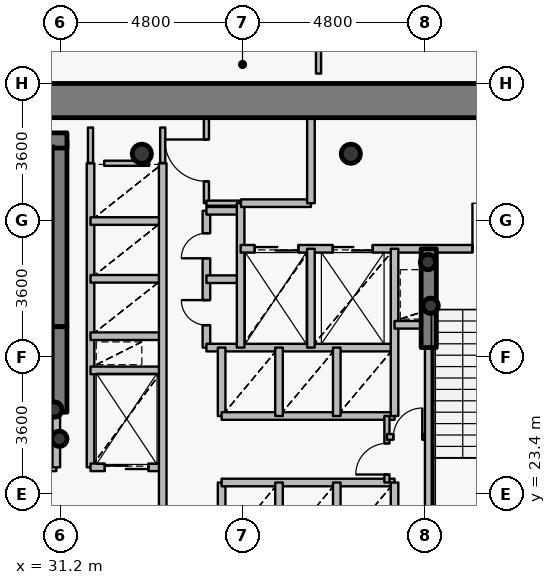
"""IFC4 building model, lengths in metres.
Left out: names, types, materials, properties, quantities, classifications, styles, units other than length and angle.
Written with IfcOpenShell. Run it as: python <this file> out.ifc"""

import sys

from ifc_helpers import new_model, si_unit, direction, frame, frame_2d, origin, origin_2d, place, context, subcontext, project, spatial, rectangle, hollow_circle, extrude, source, transform, mapped, element, fill, save


model = new_model("IFC4")
c1 = context("Model", 3, precision=1e-05, world=origin(), true_north=direction((0.0, 1.0)))
c2 = subcontext(c1, "Body", "Model", "MODEL_VIEW")
j1 = project(units=[si_unit("LENGTHUNIT", "METRE"), si_unit("PLANEANGLEUNIT", "RADIAN")], contexts=[c1])
p1 = place(None, origin())
s1 = spatial("IfcSite", under=j1, at=p1, CompositionType="ELEMENT")
p2 = place(p1, origin())
s2 = spatial("IfcBuilding", under=s1, at=p2, CompositionType="ELEMENT")
p3 = place(p2, frame((0.0, 0.0, 14.4)))
s3 = spatial("IfcBuildingStorey", under=s2, at=p3, CompositionType="ELEMENT", Elevation=14.4)
for number, where, z_axis, x_axis in (
    (1, (38.85, 32.35, 0.0), (0.0, 0.0, 1.0), (1.0, 0.0, 0.0)),
    (2, (33.35, 32.35, 0.0), (0.0, 0.0, 1.0), (1.0, 0.0, 0.0)),
):
    element("IfcColumn", number, at=place(p3, frame(where, z_axis=z_axis, x_axis=x_axis)), inside=s3, PredefinedType="COLUMN", context=c2, shape_type="SweptSolid", body=[
        extrude(hollow_circle(Radius=0.254, WallThickness=0.02, at=origin_2d()), origin(), (0.0, 0.0, 1.0), 4.2),
    ])
p4 = place(p3, frame((31.18, 27.8, 0.0), z_axis=(0.0, 0.0, 1.0), x_axis=(0.0, 1.0, 0.0)))
e3 = element("IfcWall", 3, at=p4, inside=s3, PredefinedType="SHEAR", context=c2, shape_type="SweptSolid", body=[
    extrude(rectangle(XDim=4.9, YDim=0.4, at=frame_2d((2.45, 0.0))), origin(), (0.0, 0.0, 1.0), 4.2),
])
p5 = place(p3, frame((27.28, 32.7, 0.0), z_axis=(0.0, 0.0, 1.0), x_axis=(1.0, 0.0, 0.0)))
e4 = element("IfcWall", 4, at=p5, inside=s3, PredefinedType="SHEAR", context=c2, shape_type="SweptSolid", body=[
    extrude(rectangle(XDim=4.1, YDim=0.4, at=frame_2d((2.05, 0.0))), origin(), (0.0, 0.0, 1.0), 4.2),
])
for number, where, z_axis, x_axis in (
    (5, (31.05, 25.62, 0.0), (0.0, 0.0, 1.0), (1.0, 0.0, 0.0)),
    (6, (31.18, 24.85, 0.0), (0.0, 0.0, 1.0), (1.0, 0.0, 0.0)),
    (7, (40.95, 28.35, 0.0), (0.0, 0.0, 1.0), (1.0, 0.0, 0.0)),
    (8, (40.88, 29.5, 0.0), (0.0, 0.0, 1.0), (1.0, 0.0, 0.0)),
):
    element("IfcColumn", number, at=place(p3, frame(where, z_axis=z_axis, x_axis=x_axis)), inside=s3, PredefinedType="COLUMN", context=c2, shape_type="SweptSolid", body=[
        extrude(hollow_circle(Radius=0.203, WallThickness=0.016, at=origin_2d()), origin(), (0.0, 0.0, 1.0), 4.2),
    ])
p6 = place(p3, frame((26.75, 33.75, 0.0), z_axis=(0.0, 0.0, 1.0), x_axis=(1.0, 0.0, 0.0)))
e9 = element("IfcWall", 9, at=p6, inside=s3, PredefinedType="SHEAR", context=c2, shape_type="SweptSolid", body=[
    extrude(rectangle(XDim=18.5, YDim=0.9, at=frame_2d((9.25, 0.0))), origin(), (0.0, 0.0, 1.0), 3.35),
])
p7 = place(p3, frame((31.18, 25.55, 0.0), z_axis=(0.0, 0.0, 1.0), x_axis=(0.0, 1.0, 0.0)))
e10 = element("IfcWall", 10, at=p7, inside=s3, PredefinedType="SHEAR", context=c2, shape_type="SweptSolid", body=[
    extrude(rectangle(XDim=2.25, YDim=0.4, at=frame_2d((1.125, 0.0))), origin(), (0.0, 0.0, 1.0), 3.5),
])
p8 = place(p3, frame((40.9, 27.25, 0.0), z_axis=(0.0, 0.0, 1.0), x_axis=(0.0, 1.0, 0.0)))
e11 = element("IfcWall", 11, at=p8, inside=s3, PredefinedType="SHEAR", context=c2, shape_type="SweptSolid", body=[
    extrude(rectangle(XDim=2.6, YDim=0.4, at=frame_2d((1.3, 0.0))), origin(), (0.0, 0.0, 1.0), 3.5),
])
p9 = place(p3, frame((27.56, 24.1, 0.0), z_axis=(0.0, 0.0, 1.0), x_axis=(1.0, 0.0, 0.0)))
e12 = element("IfcWall", 12, at=p9, inside=s3, PredefinedType="PARTITIONING", context=c2, shape_type="SweptSolid", body=[
    extrude(rectangle(XDim=3.54, YDim=0.2, at=frame_2d((1.77, 0.0))), origin(), (0.0, 0.0, 1.0), 3.9),
])
p10 = place(p9, frame((1.17, 0.0, 0.0)))
e13 = element("IfcOpeningElement", 13, at=p10, cuts=e12, PredefinedType="OPENING", context=c2, shape_type="SweptSolid", body=[
    extrude(rectangle(XDim=1.2, YDim=2.15, at=origin_2d()), frame((0.6, 0.11, 1.075), z_axis=(0.0, -1.0, 0.0), x_axis=(1.0, 0.0, 0.0)), (0.0, 0.0, 1.0), 0.22),
])
p11 = place(p3, frame((31.1, 24.1, 0.0), z_axis=(0.0, 0.0, 1.0), x_axis=(0.0, 1.0, 0.0)))
e14 = element("IfcWall", 14, at=p11, inside=s3, PredefinedType="PARTITIONING", context=c2, shape_type="SweptSolid", body=[
    extrude(rectangle(XDim=1.44, YDim=0.2, at=frame_2d((0.72, 0.0))), origin(), (0.0, 0.0, 1.0), 3.9),
])
p12 = place(p3, frame((32.0, 24.1, 0.0), z_axis=(0.0, 0.0, 1.0), x_axis=(0.0, 1.0, 0.0)))
e15 = element("IfcWall", 15, at=p12, inside=s3, PredefinedType="PARTITIONING", context=c2, shape_type="SweptSolid", body=[
    extrude(rectangle(XDim=8.0, YDim=0.2, at=frame_2d((4.0, 0.0))), origin(), (0.0, 0.0, 1.0), 3.9),
])
p13 = place(p3, frame((32.0, 24.1, 0.0), z_axis=(0.0, 0.0, 1.0), x_axis=(1.0, 0.0, 0.0)))
e16 = element("IfcWall", 16, at=p13, inside=s3, PredefinedType="PARTITIONING", context=c2, shape_type="SweptSolid", body=[
    extrude(rectangle(XDim=1.9, YDim=0.2, at=frame_2d((0.95, 0.0))), origin(), (0.0, 0.0, 1.0), 3.485),
])
p14 = place(p13, frame((0.375, 0.0, 0.0)))
e17 = element("IfcOpeningElement", 17, at=p14, cuts=e16, PredefinedType="OPENING", context=c2, shape_type="SweptSolid", body=[
    extrude(rectangle(XDim=1.15, YDim=2.15, at=origin_2d()), frame((0.575, 0.11, 1.075), z_axis=(0.0, -1.0, 0.0), x_axis=(1.0, 0.0, 0.0)), (0.0, 0.0, 1.0), 0.22),
])
for number, where, z_axis, x_axis in (
    (18, (32.0, 26.65, 0.0), (0.0, 0.0, 1.0), (1.0, 0.0, 0.0)),
    (19, (32.0, 27.55, 0.0), (0.0, 0.0, 1.0), (1.0, 0.0, 0.0)),
    (20, (32.0, 29.06, 0.0), (0.0, 0.0, 1.0), (1.0, 0.0, 0.0)),
    (21, (32.0, 30.58, 0.0), (0.0, 0.0, 1.0), (1.0, 0.0, 0.0)),
):
    element("IfcWall", number, at=place(p3, frame(where, z_axis=z_axis, x_axis=x_axis)), inside=s3, PredefinedType="PARTITIONING", context=c2, shape_type="SweptSolid", body=[
        extrude(rectangle(XDim=1.9, YDim=0.2, at=frame_2d((0.95, 0.0))), origin(), (0.0, 0.0, 1.0), 3.485),
    ])
p15 = place(p3, frame((33.9, 20.7, 0.0), z_axis=(0.0, 0.0, 1.0), x_axis=(0.0, 1.0, 0.0)))
e22 = element("IfcWall", 22, at=p15, inside=s3, PredefinedType="PARTITIONING", context=c2, shape_type="SweptSolid", body=[
    extrude(rectangle(XDim=11.4, YDim=0.2, at=frame_2d((5.7, 0.0))), origin(), (0.0, 0.0, 1.0), 3.485),
])
p16 = place(p3, frame((35.05, 27.25, 0.0), z_axis=(0.0, 0.0, 1.0), x_axis=(0.0, 1.0, 0.0)))
e23 = element("IfcWall", 23, at=p16, inside=s3, PredefinedType="PARTITIONING", context=c2, shape_type="SweptSolid", body=[
    extrude(rectangle(XDim=3.6, YDim=0.2, at=frame_2d((1.8, 0.0))), origin(), (0.0, 0.0, 1.0), 3.9),
])
p17 = place(p16, frame((0.59, 0.0, 0.0)))
e24 = element("IfcOpeningElement", 24, at=p17, cuts=e23, PredefinedType="OPENING", context=c2, shape_type="SweptSolid", body=[
    extrude(rectangle(XDim=0.66, YDim=2.05, at=origin_2d()), frame((0.33, 0.11, 1.025), z_axis=(0.0, -1.0, 0.0), x_axis=(1.0, 0.0, 0.0)), (0.0, 0.0, 1.0), 0.22),
])
p18 = place(p16, frame((2.35, 0.0, 0.0)))
e25 = element("IfcOpeningElement", 25, at=p18, cuts=e23, PredefinedType="OPENING", context=c2, shape_type="SweptSolid", body=[
    extrude(rectangle(XDim=0.66, YDim=2.05, at=origin_2d()), frame((0.33, 0.11, 1.025), z_axis=(0.0, -1.0, 0.0), x_axis=(1.0, 0.0, 0.0)), (0.0, 0.0, 1.0), 0.22),
])
p19 = place(p3, frame((35.05, 27.25, 0.0), z_axis=(0.0, 0.0, 1.0), x_axis=(1.0, 0.0, 0.0)))
e26 = element("IfcWall", 26, at=p19, inside=s3, PredefinedType="PARTITIONING", context=c2, shape_type="SweptSolid", body=[
    extrude(rectangle(XDim=4.95, YDim=0.2, at=frame_2d((2.475, 0.0))), origin(), (0.0, 0.0, 1.0), 3.485),
])
for number, where, z_axis, x_axis in (
    (27, (35.05, 29.05, 0.0), (0.0, 0.0, 1.0), (1.0, 0.0, 0.0)),
    (28, (35.05, 30.85, 0.0), (0.0, 0.0, 1.0), (1.0, 0.0, 0.0)),
):
    element("IfcWall", number, at=place(p3, frame(where, z_axis=z_axis, x_axis=x_axis)), inside=s3, PredefinedType="PARTITIONING", context=c2, shape_type="SweptSolid", body=[
        extrude(rectangle(XDim=0.9, YDim=0.2, at=frame_2d((0.45, 0.0))), origin(), (0.0, 0.0, 1.0), 3.9),
    ])
p20 = place(p3, frame((35.05, 31.05, 0.0), z_axis=(0.0, 0.0, 1.0), x_axis=(0.0, 1.0, 0.0)))
e29 = element("IfcWall", 29, at=p20, inside=s3, PredefinedType="PARTITIONING", context=c2, shape_type="SweptSolid", body=[
    extrude(rectangle(XDim=2.25, YDim=0.135, at=frame_2d((1.125, 0.0))), origin(), (0.0, 0.0, 1.0), 3.485),
])
p21 = place(p20, frame((0.575, 0.0, 0.0)))
e30 = element("IfcOpeningElement", 30, at=p21, cuts=e29, PredefinedType="OPENING", context=c2, shape_type="SweptSolid", body=[
    extrude(rectangle(XDim=1.1, YDim=2.15, at=origin_2d()), frame((0.55, 0.078, 1.075), z_axis=(0.0, -1.0, 0.0), x_axis=(1.0, 0.0, 0.0)), (0.0, 0.0, 1.0), 0.155),
])
p22 = place(p3, frame((35.05, 31.05, 0.0), z_axis=(0.0, 0.0, 1.0), x_axis=(1.0, 0.0, 0.0)))
e31 = element("IfcWall", 31, at=p22, inside=s3, PredefinedType="PARTITIONING", context=c2, shape_type="SweptSolid", body=[
    extrude(rectangle(XDim=0.9, YDim=0.135, at=frame_2d((0.45, 0.0))), origin(), (0.0, 0.0, 1.0), 3.9),
])
p23 = place(p3, frame((35.45, 21.9, 0.0), z_axis=(0.0, 0.0, 1.0), x_axis=(0.0, 1.0, 0.0)))
e32 = element("IfcWall", 32, at=p23, inside=s3, PredefinedType="PARTITIONING", context=c2, shape_type="SweptSolid", body=[
    extrude(rectangle(XDim=1.8, YDim=0.2, at=frame_2d((0.9, 0.0))), origin(), (0.0, 0.0, 1.0), 3.9),
])
p24 = place(p3, frame((35.45, 23.7, 0.0), z_axis=(0.0, 0.0, 1.0), x_axis=(1.0, 0.0, 0.0)))
e33 = element("IfcWall", 33, at=p24, inside=s3, PredefinedType="PARTITIONING", context=c2, shape_type="SweptSolid", body=[
    extrude(rectangle(XDim=4.55, YDim=0.2, at=frame_2d((2.275, 0.0))), origin(), (0.0, 0.0, 1.0), 3.485),
])
p25 = place(p3, frame((35.45, 25.45, 0.0), z_axis=(0.0, 0.0, 1.0), x_axis=(0.0, 1.0, 0.0)))
e34 = element("IfcWall", 34, at=p25, inside=s3, PredefinedType="PARTITIONING", context=c2, shape_type="SweptSolid", body=[
    extrude(rectangle(XDim=1.8, YDim=0.2, at=frame_2d((0.9, 0.0))), origin(), (0.0, 0.0, 1.0), 3.9),
])
p26 = place(p3, frame((35.45, 25.45, 0.0), z_axis=(0.0, 0.0, 1.0), x_axis=(1.0, 0.0, 0.0)))
e35 = element("IfcWall", 35, at=p26, inside=s3, PredefinedType="PARTITIONING", context=c2, shape_type="SweptSolid", body=[
    extrude(rectangle(XDim=4.55, YDim=0.2, at=frame_2d((2.275, 0.0))), origin(), (0.0, 0.0, 1.0), 3.485),
])
p27 = place(p3, frame((35.95, 27.25, 0.0), z_axis=(0.0, 0.0, 1.0), x_axis=(0.0, 1.0, 0.0)))
e36 = element("IfcWall", 36, at=p27, inside=s3, PredefinedType="PARTITIONING", context=c2, shape_type="SweptSolid", body=[
    extrude(rectangle(XDim=3.8, YDim=0.2, at=frame_2d((1.9, 0.0))), origin(), (0.0, 0.0, 1.0), 3.9),
])
p28 = place(p3, frame((35.95, 29.85, 0.0), z_axis=(0.0, 0.0, 1.0), x_axis=(1.0, 0.0, 0.0)))
e37 = element("IfcWall", 37, at=p28, inside=s3, PredefinedType="PARTITIONING", context=c2, shape_type="SweptSolid", body=[
    extrude(rectangle(XDim=8.49, YDim=0.2, at=frame_2d((4.245, 0.0))), origin(), (0.0, 0.0, 1.0), 3.485),
])
p29 = place(p28, frame((6.1, 0.0, 0.0)))
e38 = element("IfcOpeningElement", 38, at=p29, cuts=e37, PredefinedType="OPENING", context=c2, shape_type="SweptSolid", body=[
    extrude(rectangle(XDim=1.2, YDim=2.15, at=origin_2d()), frame((0.6, 0.11, 1.075), z_axis=(0.0, -1.0, 0.0), x_axis=(1.0, 0.0, 0.0)), (0.0, 0.0, 1.0), 0.22),
])
p30 = place(p28, frame((0.37, 0.0, 0.0)))
e39 = element("IfcOpeningElement", 39, at=p30, cuts=e37, PredefinedType="OPENING", context=c2, shape_type="SweptSolid", body=[
    extrude(rectangle(XDim=1.15, YDim=2.15, at=origin_2d()), frame((0.575, 0.11, 1.075), z_axis=(0.0, -1.0, 0.0), x_axis=(1.0, 0.0, 0.0)), (0.0, 0.0, 1.0), 0.22),
])
p31 = place(p28, frame((2.425, 0.0, 0.0)))
e40 = element("IfcOpeningElement", 40, at=p31, cuts=e37, PredefinedType="OPENING", context=c2, shape_type="SweptSolid", body=[
    extrude(rectangle(XDim=1.05, YDim=2.15, at=origin_2d()), frame((0.525, 0.11, 1.075), z_axis=(0.0, -1.0, 0.0), x_axis=(1.0, 0.0, 0.0)), (0.0, 0.0, 1.0), 0.22),
])
p32 = place(p3, frame((35.96, 31.05, 0.0), z_axis=(0.0, 0.0, 1.0), x_axis=(1.0, 0.0, 0.0)))
e41 = element("IfcWall", 41, at=p32, inside=s3, PredefinedType="PARTITIONING", context=c2, shape_type="SweptSolid", body=[
    extrude(rectangle(XDim=1.84, YDim=0.2, at=frame_2d((0.92, 0.0))), origin(), (0.0, 0.0, 1.0), 3.9),
])
for number, where, z_axis, x_axis in (
    (42, (36.96, 21.9, 0.0), (0.0, 0.0, 1.0), (0.0, 1.0, 0.0)),
    (43, (36.96, 25.45, 0.0), (0.0, 0.0, 1.0), (0.0, 1.0, 0.0)),
):
    element("IfcWall", number, at=place(p3, frame(where, z_axis=z_axis, x_axis=x_axis)), inside=s3, PredefinedType="PARTITIONING", context=c2, shape_type="SweptSolid", body=[
        extrude(rectangle(XDim=1.8, YDim=0.2, at=frame_2d((0.9, 0.0))), origin(), (0.0, 0.0, 1.0), 3.9),
    ])
p33 = place(p3, frame((37.8, 27.25, 0.0), z_axis=(0.0, 0.0, 1.0), x_axis=(0.0, 1.0, 0.0)))
e44 = element("IfcWall", 44, at=p33, inside=s3, PredefinedType="PARTITIONING", context=c2, shape_type="SweptSolid", body=[
    extrude(rectangle(XDim=2.6, YDim=0.2, at=frame_2d((1.3, 0.0))), origin(), (0.0, 0.0, 1.0), 3.9),
])
p34 = place(p3, frame((37.8, 31.05, 0.0), z_axis=(0.0, 0.0, 1.0), x_axis=(0.0, 1.0, 0.0)))
e45 = element("IfcWall", 45, at=p34, inside=s3, PredefinedType="PARTITIONING", context=c2, shape_type="SweptSolid", body=[
    extrude(rectangle(XDim=2.25, YDim=0.2, at=frame_2d((1.125, 0.0))), origin(), (0.0, 0.0, 1.0), 3.485),
])
for number, where, z_axis, x_axis in (
    (46, (38.48, 21.9, 0.0), (0.0, 0.0, 1.0), (0.0, 1.0, 0.0)),
    (47, (38.48, 25.45, 0.0), (0.0, 0.0, 1.0), (0.0, 1.0, 0.0)),
):
    element("IfcWall", number, at=place(p3, frame(where, z_axis=z_axis, x_axis=x_axis)), inside=s3, PredefinedType="PARTITIONING", context=c2, shape_type="SweptSolid", body=[
        extrude(rectangle(XDim=1.8, YDim=0.2, at=frame_2d((0.9, 0.0))), origin(), (0.0, 0.0, 1.0), 3.9),
    ])
p35 = place(p3, frame((39.8, 23.7, 0.0), z_axis=(0.0, 0.0, 1.0), x_axis=(0.0, 1.0, 0.0)))
e48 = element("IfcWall", 48, at=p35, inside=s3, PredefinedType="PARTITIONING", context=c2, shape_type="SweptSolid", body=[
    extrude(rectangle(XDim=1.75, YDim=0.135, at=frame_2d((0.875, 0.0))), origin(), (0.0, 0.0, 1.0), 3.9),
])
p36 = place(p35, frame((0.21, 0.0, 0.0)))
e49 = element("IfcOpeningElement", 49, at=p36, cuts=e48, PredefinedType="OPENING", context=c2, shape_type="SweptSolid", body=[
    extrude(rectangle(XDim=0.82, YDim=2.1, at=origin_2d()), frame((0.41, 0.078, 1.05), z_axis=(0.0, -1.0, 0.0), x_axis=(1.0, 0.0, 0.0)), (0.0, 0.0, 1.0), 0.155),
])
p37 = place(p3, frame((39.8, 24.9, 0.0), z_axis=(0.0, 0.0, 1.0), x_axis=(1.0, 0.0, 0.0)))
e50 = element("IfcWall", 50, at=p37, inside=s3, PredefinedType="PARTITIONING", context=c2, shape_type="SweptSolid", body=[
    extrude(rectangle(XDim=1.1, YDim=0.15, at=frame_2d((0.55, 0.0))), origin(), (0.0, 0.0, 1.0), 3.9),
])
p38 = place(p37, frame((0.17, 0.0, 0.0)))
e51 = element("IfcOpeningElement", 51, at=p38, cuts=e50, PredefinedType="OPENING", context=c2, shape_type="SweptSolid", body=[
    extrude(rectangle(XDim=0.76, YDim=2.1, at=origin_2d()), frame((0.38, 0.085, 1.05), z_axis=(0.0, -1.0, 0.0), x_axis=(1.0, 0.0, 0.0)), (0.0, 0.0, 1.0), 0.17),
])
p39 = place(p3, frame((40.0, 21.9, 0.0), z_axis=(0.0, 0.0, 1.0), x_axis=(0.0, 1.0, 0.0)))
e52 = element("IfcWall", 52, at=p39, inside=s3, PredefinedType="PARTITIONING", context=c2, shape_type="SweptSolid", body=[
    extrude(rectangle(XDim=1.8, YDim=0.2, at=frame_2d((0.9, 0.0))), origin(), (0.0, 0.0, 1.0), 3.9),
])
p40 = place(p3, frame((40.0, 25.45, 0.0), z_axis=(0.0, 0.0, 1.0), x_axis=(0.0, 1.0, 0.0)))
e53 = element("IfcWall", 53, at=p40, inside=s3, PredefinedType="PARTITIONING", context=c2, shape_type="SweptSolid", body=[
    extrude(rectangle(XDim=4.4, YDim=0.2, at=frame_2d((2.2, 0.0))), origin(), (0.0, 0.0, 1.0), 3.9),
])
p41 = place(p3, frame((40.0, 27.85, 0.0), z_axis=(0.0, 0.0, 1.0), x_axis=(1.0, 0.0, 0.0)))
e54 = element("IfcWall", 54, at=p41, inside=s3, PredefinedType="PARTITIONING", context=c2, shape_type="SweptSolid", body=[
    extrude(rectangle(XDim=0.9, YDim=0.2, at=frame_2d((0.45, 0.0))), origin(), (0.0, 0.0, 1.0), 3.9),
])
p42 = place(p3, frame((40.9, 21.33, 0.0), z_axis=(0.0, 0.0, 1.0), x_axis=(0.0, 1.0, 0.0)))
e55 = element("IfcWall", 55, at=p42, inside=s3, PredefinedType="PARTITIONING", context=c2, shape_type="SweptSolid", body=[
    extrude(rectangle(XDim=5.91, YDim=0.2, at=frame_2d((2.955, 0.0))), origin(), (0.0, 0.0, 1.0), 3.435),
])
p43 = place(p3, frame((32.36, 32.1, 0.0), z_axis=(0.0, 0.0, 1.0), x_axis=(1.0, 0.0, 0.0)))
e56 = element("IfcWall", 56, at=p43, inside=s3, PredefinedType="PARTITIONING", context=c2, shape_type="SweptSolid", body=[
    extrude(rectangle(XDim=1.18, YDim=0.135, at=frame_2d((0.59, 0.0))), origin(), (0.0, 0.0, 1.0), 3.485),
])
p44 = place(p3, frame((32.0, 33.04, 0.0), z_axis=(0.0, 0.0, 1.0), x_axis=(0.0, -1.0, 0.0)))
e57 = element("IfcWall", 57, at=p44, inside=s3, PredefinedType="PARTITIONING", context=c2, shape_type="SweptSolid", body=[
    extrude(rectangle(XDim=0.93, YDim=0.135, at=frame_2d((0.465, 0.0))), origin(), (0.0, 0.0, 1.0), 3.435),
])
p45 = place(p3, frame((33.9, 32.11, 0.0), z_axis=(0.0, 0.0, 1.0), x_axis=(0.0, 1.0, 0.0)))
e58 = element("IfcWall", 58, at=p45, inside=s3, PredefinedType="PARTITIONING", context=c2, shape_type="SweptSolid", body=[
    extrude(rectangle(XDim=0.93, YDim=0.135, at=frame_2d((0.465, 0.0))), origin(), (0.0, 0.0, 1.0), 3.485),
])
p46 = place(p3, frame((38.0, 34.46, 0.0), z_axis=(0.0, 0.0, 1.0), x_axis=(0.0, 1.0, 0.0)))
e59 = element("IfcWall", 59, at=p46, inside=s3, PredefinedType="PARTITIONING", context=c2, shape_type="SweptSolid", body=[
    extrude(rectangle(XDim=1.64, YDim=0.135, at=frame_2d((0.82, 0.0))), origin(), (0.0, 0.0, 1.0), 3.9),
])
m1 = source(origin(), c2, "Body", "SweptSolid", [
    extrude(rectangle(XDim=1.2, YDim=2.15, at=origin_2d()), frame((0.6, 0.025, 1.075), z_axis=(0.0, -1.0, 0.0), x_axis=(1.0, 0.0, 0.0)), (0.0, 0.0, 1.0), 0.05),
])
p47 = place(p29, origin())
e60 = element("IfcDoor", 60, at=p47, inside=s3, OperationType="SINGLE_SWING_LEFT", PredefinedType="DOOR", context=c2, shape_type="MappedRepresentation", body=[
    mapped(m1, transform((0.0, 0.0, 0.0), x_axis=(1.0, 0.0, 0.0), y_axis=(0.0, 1.0, 0.0), z_axis=(0.0, 0.0, 1.0), scale=1.0)),
])
fill(e38, e60)
m2 = source(origin(), c2, "Body", "SweptSolid", [
    extrude(rectangle(XDim=1.15, YDim=2.15, at=origin_2d()), frame((0.575, 0.025, 1.075), z_axis=(0.0, -1.0, 0.0), x_axis=(1.0, 0.0, 0.0)), (0.0, 0.0, 1.0), 0.05),
])
p48 = place(p30, origin())
e61 = element("IfcDoor", 61, at=p48, inside=s3, OperationType="DOUBLE_DOOR_SLIDING", PredefinedType="USERDEFINED", context=c2, shape_type="MappedRepresentation", body=[
    mapped(m2, transform((0.0, 0.0, 0.0), x_axis=(1.0, 0.0, 0.0), y_axis=(0.0, 1.0, 0.0), z_axis=(0.0, 0.0, 1.0), scale=1.0)),
])
fill(e39, e61)
p49 = place(p14, origin())
e62 = element("IfcDoor", 62, at=p49, inside=s3, OperationType="DOUBLE_DOOR_SLIDING", PredefinedType="USERDEFINED", context=c2, shape_type="MappedRepresentation", body=[
    mapped(m2, transform((0.0, 0.0, 0.0), x_axis=(1.0, 0.0, 0.0), y_axis=(0.0, 1.0, 0.0), z_axis=(0.0, 0.0, 1.0), scale=1.0)),
])
fill(e17, e62)
m3 = source(origin(), c2, "Body", "SweptSolid", [
    extrude(rectangle(XDim=1.05, YDim=2.15, at=origin_2d()), frame((0.525, 0.025, 1.075), z_axis=(0.0, -1.0, 0.0), x_axis=(1.0, 0.0, 0.0)), (0.0, 0.0, 1.0), 0.05),
])
p50 = place(p31, origin())
e63 = element("IfcDoor", 63, at=p50, inside=s3, OperationType="DOUBLE_DOOR_SLIDING", PredefinedType="USERDEFINED", context=c2, shape_type="MappedRepresentation", body=[
    mapped(m3, transform((0.0, 0.0, 0.0), x_axis=(1.0, 0.0, 0.0), y_axis=(0.0, 1.0, 0.0), z_axis=(0.0, 0.0, 1.0), scale=1.0)),
])
fill(e40, e63)
m4 = source(origin(), c2, "Body", "SweptSolid", [
    extrude(rectangle(XDim=0.66, YDim=2.05, at=origin_2d()), frame((0.33, 0.025, 1.025), z_axis=(0.0, -1.0, 0.0), x_axis=(1.0, 0.0, 0.0)), (0.0, 0.0, 1.0), 0.05),
])
p51 = place(p17, origin())
e64 = element("IfcDoor", 64, at=p51, inside=s3, OperationType="SINGLE_SWING_RIGHT", PredefinedType="USERDEFINED", context=c2, shape_type="MappedRepresentation", body=[
    mapped(m4, transform((0.0, 0.0, 0.0), x_axis=(1.0, 0.0, 0.0), y_axis=(0.0, 1.0, 0.0), z_axis=(0.0, 0.0, 1.0), scale=1.0)),
])
fill(e24, e64)
p52 = place(p18, origin())
e65 = element("IfcDoor", 65, at=p52, inside=s3, OperationType="SINGLE_SWING_LEFT", PredefinedType="USERDEFINED", context=c2, shape_type="MappedRepresentation", body=[
    mapped(m4, transform((0.0, 0.0, 0.0), x_axis=(1.0, 0.0, 0.0), y_axis=(0.0, 1.0, 0.0), z_axis=(0.0, 0.0, 1.0), scale=1.0)),
])
fill(e25, e65)
m5 = source(origin(), c2, "Body", "SweptSolid", [
    extrude(rectangle(XDim=1.1, YDim=2.15, at=origin_2d()), frame((0.55, 0.025, 1.075), z_axis=(0.0, -1.0, 0.0), x_axis=(1.0, 0.0, 0.0)), (0.0, 0.0, 1.0), 0.05),
])
p53 = place(p21, origin())
e66 = element("IfcDoor", 66, at=p53, inside=s3, OperationType="SINGLE_SWING_RIGHT", PredefinedType="DOOR", context=c2, shape_type="MappedRepresentation", body=[
    mapped(m5, transform((0.0, 0.0, 0.0), x_axis=(1.0, 0.0, 0.0), y_axis=(0.0, 1.0, 0.0), z_axis=(0.0, 0.0, 1.0), scale=1.0)),
])
fill(e30, e66)
m6 = source(origin(), c2, "Body", "SweptSolid", [
    extrude(rectangle(XDim=0.82, YDim=2.1, at=origin_2d()), frame((0.41, 0.025, 1.05), z_axis=(0.0, -1.0, 0.0), x_axis=(1.0, 0.0, 0.0)), (0.0, 0.0, 1.0), 0.05),
])
p54 = place(p36, origin())
e67 = element("IfcDoor", 67, at=p54, inside=s3, OperationType="SINGLE_SWING_LEFT", PredefinedType="DOOR", context=c2, shape_type="MappedRepresentation", body=[
    mapped(m6, transform((0.0, 0.0, 0.0), x_axis=(1.0, 0.0, 0.0), y_axis=(0.0, 1.0, 0.0), z_axis=(0.0, 0.0, 1.0), scale=1.0)),
])
fill(e49, e67)
m7 = source(origin(), c2, "Body", "SweptSolid", [
    extrude(rectangle(XDim=0.76, YDim=2.1, at=origin_2d()), frame((0.38, 0.025, 1.05), z_axis=(0.0, -1.0, 0.0), x_axis=(1.0, 0.0, 0.0)), (0.0, 0.0, 1.0), 0.05),
])
p55 = place(p38, origin())
e68 = element("IfcDoor", 68, at=p55, inside=s3, OperationType="SINGLE_SWING_RIGHT", PredefinedType="DOOR", context=c2, shape_type="MappedRepresentation", body=[
    mapped(m7, transform((0.0, 0.0, 0.0), x_axis=(1.0, 0.0, 0.0), y_axis=(0.0, 1.0, 0.0), z_axis=(0.0, 0.0, 1.0), scale=1.0)),
])
fill(e51, e68)
save(model, sys.argv[1])
